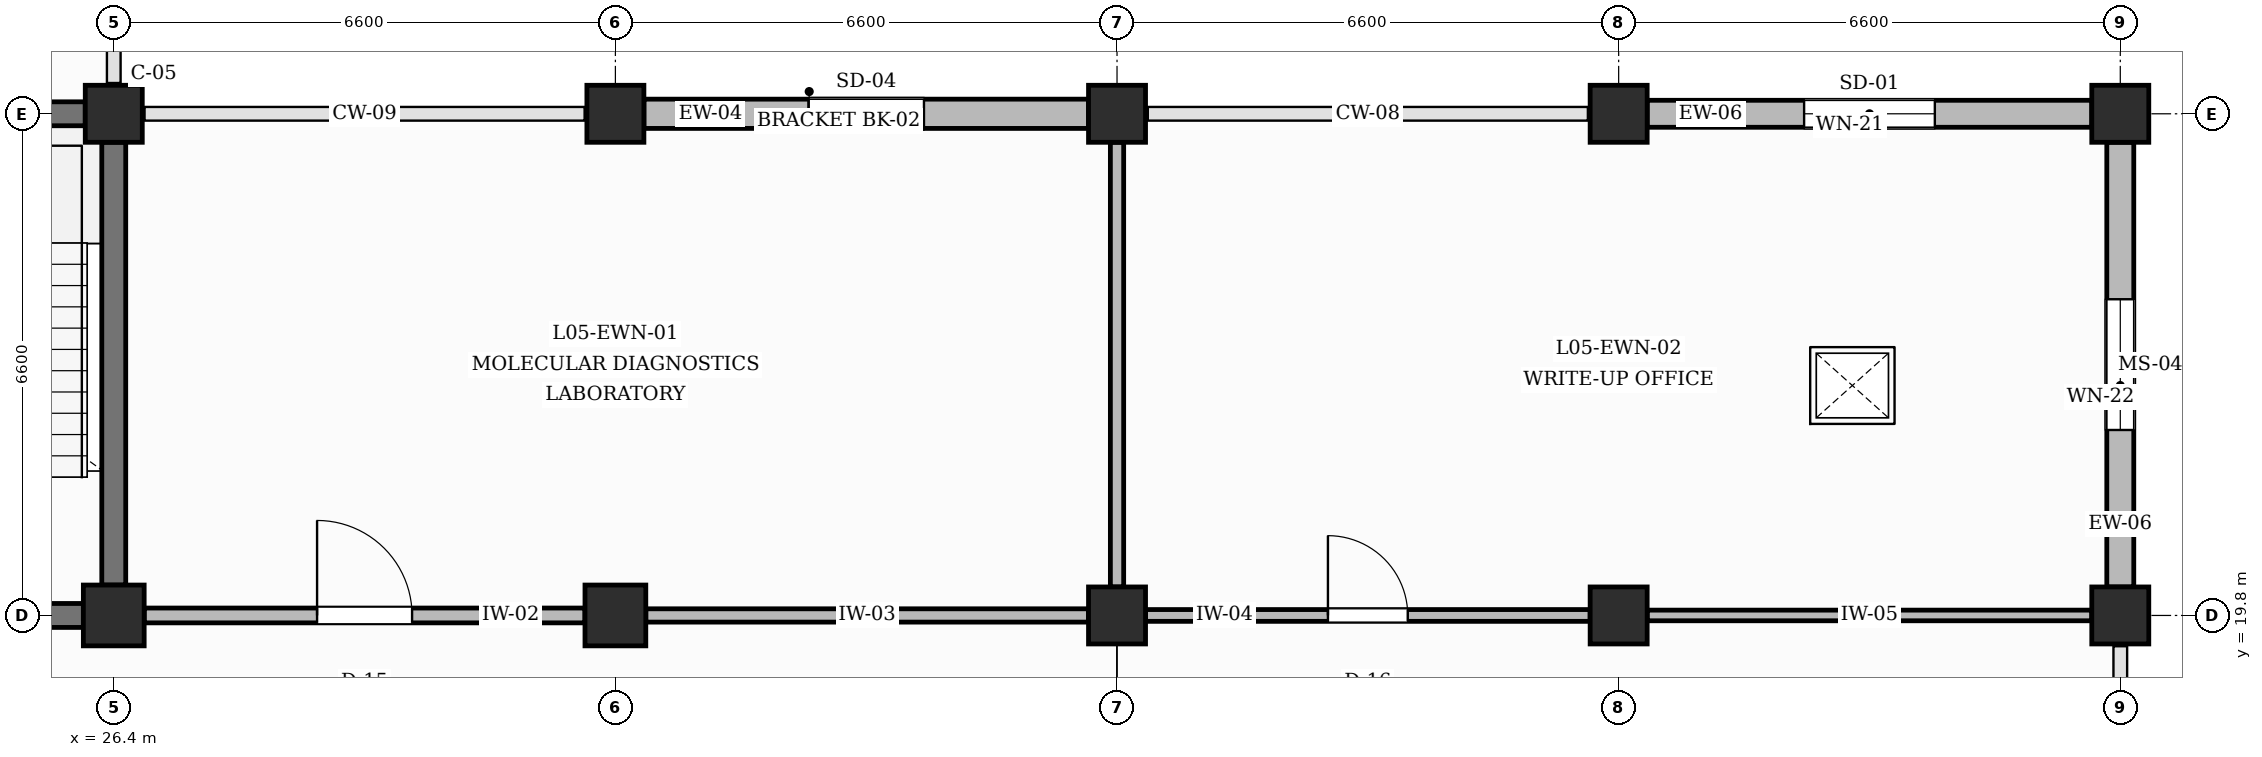
"""IFC4 building model, lengths in metres.
Left out: names, types, materials, properties, quantities, classifications, styles, units other than length and angle.
Written with IfcOpenShell. Run it as: python <this file> out.ifc"""

import sys

from ifc_helpers import new_model, si_unit, direction, frame, frame_2d, origin, origin_2d, place, context, subcontext, project, spatial, rectangle, extrude, element, fill, save


model = new_model("IFC4")
c1 = context("Model", 3, precision=1e-05, world=origin(), true_north=direction((0.0, 1.0)))
c2 = subcontext(c1, "Body", "Model", "MODEL_VIEW")
j1 = project(units=[si_unit("LENGTHUNIT", "METRE"), si_unit("PLANEANGLEUNIT", "RADIAN")], contexts=[c1])
p1 = place(None, origin())
s1 = spatial("IfcSite", under=j1, at=p1, CompositionType="ELEMENT")
p2 = place(p1, origin())
s2 = spatial("IfcBuilding", under=s1, at=p2, CompositionType="ELEMENT")
p3 = place(p2, frame((0.0, 0.0, 22.8)))
s3 = spatial("IfcBuildingStorey", under=s2, at=p3, CompositionType="ELEMENT", Elevation=22.8)
p4 = place(p3, frame((26.4, 19.8, 0.0), z_axis=(0.0, 0.0, 1.0), x_axis=(1.0, 0.0, 0.0)))
e1 = element("IfcColumn", 1, at=p4, inside=s3, PredefinedType="COLUMN", context=c2, shape_type="SweptSolid", body=[
    extrude(rectangle(XDim=0.8, YDim=0.8, at=origin_2d()), origin(), (0.0, 0.0, 1.0), 4.2),
])
p5 = place(p3, frame((26.4, 26.4, 0.0), z_axis=(0.0, 0.0, 1.0), x_axis=(1.0, 0.0, 0.0)))
e2 = element("IfcColumn", 2, at=p5, inside=s3, PredefinedType="COLUMN", context=c2, shape_type="SweptSolid", body=[
    extrude(rectangle(XDim=0.75, YDim=0.75, at=origin_2d()), origin(), (0.0, 0.0, 1.0), 4.2),
])
p6 = place(p3, frame((33.0, 19.8, 0.0), z_axis=(0.0, 0.0, 1.0), x_axis=(1.0, 0.0, 0.0)))
e3 = element("IfcColumn", 3, at=p6, inside=s3, PredefinedType="COLUMN", context=c2, shape_type="SweptSolid", body=[
    extrude(rectangle(XDim=0.8, YDim=0.8, at=origin_2d()), origin(), (0.0, 0.0, 1.0), 4.2),
])
for number, where, z_axis, x_axis in (
    (4, (33.0, 26.4, 0.0), (0.0, 0.0, 1.0), (1.0, 0.0, 0.0)),
    (5, (39.6, 19.8, 0.0), (0.0, 0.0, 1.0), (1.0, 0.0, 0.0)),
    (6, (39.6, 26.4, 0.0), (0.0, 0.0, 1.0), (1.0, 0.0, 0.0)),
    (7, (46.2, 19.8, 0.0), (0.0, 0.0, 1.0), (1.0, 0.0, 0.0)),
    (8, (46.2, 26.4, 0.0), (0.0, 0.0, 1.0), (1.0, 0.0, 0.0)),
    (9, (52.8, 19.8, 0.0), (0.0, 0.0, 1.0), (1.0, 0.0, 0.0)),
    (10, (52.8, 26.4, 0.0), (0.0, 0.0, 1.0), (1.0, 0.0, 0.0)),
):
    element("IfcColumn", number, at=place(p3, frame(where, z_axis=z_axis, x_axis=x_axis)), inside=s3, PredefinedType="COLUMN", context=c2, shape_type="SweptSolid", body=[
        extrude(rectangle(XDim=0.75, YDim=0.75, at=origin_2d()), origin(), (0.0, 0.0, 1.0), 4.2),
    ])
p7 = place(p3, frame((33.375, 26.4, 0.0), z_axis=(0.0, 0.0, 1.0), x_axis=(1.0, 0.0, 0.0)))
e11 = element("IfcWall", 11, at=p7, inside=s3, PredefinedType="SOLIDWALL", context=c2, shape_type="SweptSolid", body=[
    extrude(rectangle(XDim=5.85, YDim=0.385, at=frame_2d((2.925, 0.0))), origin(), (0.0, 0.0, 1.0), 3.27),
])
p8 = place(p7, frame((2.165, 0.0, 0.95)))
e12 = element("IfcOpeningElement", 12, at=p8, cuts=e11, PredefinedType="OPENING", context=c2, shape_type="SweptSolid", body=[
    extrude(rectangle(XDim=1.52, YDim=1.74, at=frame_2d((0.76, 0.87))), frame((0.0, 0.202, 0.0), z_axis=(0.0, -1.0, 0.0), x_axis=(1.0, 0.0, 0.0)), (0.0, 0.0, 1.0), 0.405),
])
p9 = place(p3, frame((46.575, 26.4, 0.0), z_axis=(0.0, 0.0, 1.0), x_axis=(1.0, 0.0, 0.0)))
e13 = element("IfcWall", 13, at=p9, inside=s3, PredefinedType="SOLIDWALL", context=c2, shape_type="SweptSolid", body=[
    extrude(rectangle(XDim=5.85, YDim=0.355, at=frame_2d((2.925, 0.0))), origin(), (0.0, 0.0, 1.0), 3.27),
])
p10 = place(p9, frame((2.065, 0.0, 0.95)))
e14 = element("IfcOpeningElement", 14, at=p10, cuts=e13, PredefinedType="OPENING", context=c2, shape_type="SweptSolid", body=[
    extrude(rectangle(XDim=1.72, YDim=1.3, at=frame_2d((0.86, 0.65))), frame((0.0, 0.188, 0.0), z_axis=(0.0, -1.0, 0.0), x_axis=(1.0, 0.0, 0.0)), (0.0, 0.0, 1.0), 0.375),
])
p11 = place(p3, frame((52.8, 20.175, 0.0), z_axis=(0.0, 0.0, 1.0), x_axis=(0.0, 1.0, 0.0)))
e15 = element("IfcWall", 15, at=p11, inside=s3, PredefinedType="SOLIDWALL", context=c2, shape_type="SweptSolid", body=[
    extrude(rectangle(XDim=5.85, YDim=0.355, at=frame_2d((2.925, 0.0))), origin(), (0.0, 0.0, 1.0), 3.27),
])
p12 = place(p11, frame((2.065, 0.0, 0.95)))
e16 = element("IfcOpeningElement", 16, at=p12, cuts=e15, PredefinedType="OPENING", context=c2, shape_type="SweptSolid", body=[
    extrude(rectangle(XDim=1.72, YDim=1.52, at=frame_2d((0.86, 0.76))), frame((0.0, 0.188, 0.0), z_axis=(0.0, -1.0, 0.0), x_axis=(1.0, 0.0, 0.0)), (0.0, 0.0, 1.0), 0.375),
])
p13 = place(p3, frame((20.2, 19.8, 0.0), z_axis=(0.0, 0.0, 1.0), x_axis=(1.0, 0.0, 0.0)))
e17 = element("IfcWall", 17, at=p13, inside=s3, PredefinedType="SHEAR", context=c2, shape_type="SweptSolid", body=[
    extrude(rectangle(XDim=5.8, YDim=0.315, at=frame_2d((2.9, 0.0))), origin(), (0.0, 0.0, 1.0), 3.17),
])
p14 = place(p13, frame((2.35, 0.0, 0.0)))
e18 = element("IfcOpeningElement", 18, at=p14, cuts=e17, PredefinedType="OPENING", context=c2, shape_type="SweptSolid", body=[
    extrude(rectangle(XDim=1.1, YDim=2.15, at=frame_2d((0.55, 1.075))), frame((0.0, 0.167, 0.0), z_axis=(0.0, -1.0, 0.0), x_axis=(1.0, 0.0, 0.0)), (0.0, 0.0, 1.0), 0.335),
])
for number, where, z_axis, x_axis in (
    (19, (20.2, 26.4, 0.0), (0.0, 0.0, 1.0), (1.0, 0.0, 0.0)),
    (20, (26.4, 20.2, 0.0), (0.0, 0.0, 1.0), (0.0, 1.0, 0.0)),
):
    element("IfcWall", number, at=place(p3, frame(where, z_axis=z_axis, x_axis=x_axis)), inside=s3, PredefinedType="SHEAR", context=c2, shape_type="SweptSolid", body=[
        extrude(rectangle(XDim=5.825, YDim=0.315, at=frame_2d((2.913, 0.0))), origin(), (0.0, 0.0, 1.0), 3.17),
    ])
p15 = place(p3, frame((26.8, 19.8, 0.0), z_axis=(0.0, 0.0, 1.0), x_axis=(1.0, 0.0, 0.0)))
e21 = element("IfcWall", 21, at=p15, inside=s3, PredefinedType="PARTITIONING", context=c2, shape_type="SweptSolid", body=[
    extrude(rectangle(XDim=5.8, YDim=0.195, at=frame_2d((2.9, 0.0))), origin(), (0.0, 0.0, 1.0), 3.17),
])
p16 = place(p15, frame((2.275, 0.0, 0.0)))
e22 = element("IfcOpeningElement", 22, at=p16, cuts=e21, PredefinedType="OPENING", context=c2, shape_type="SweptSolid", body=[
    extrude(rectangle(XDim=1.25, YDim=2.25, at=frame_2d((0.625, 1.125))), frame((0.0, 0.107, 0.0), z_axis=(0.0, -1.0, 0.0), x_axis=(1.0, 0.0, 0.0)), (0.0, 0.0, 1.0), 0.215),
])
p17 = place(p3, frame((33.4, 19.8, 0.0), z_axis=(0.0, 0.0, 1.0), x_axis=(1.0, 0.0, 0.0)))
e23 = element("IfcWall", 23, at=p17, inside=s3, PredefinedType="PARTITIONING", context=c2, shape_type="SweptSolid", body=[
    extrude(rectangle(XDim=5.825, YDim=0.175, at=frame_2d((2.913, 0.0))), origin(), (0.0, 0.0, 1.0), 3.17),
])
p18 = place(p3, frame((39.6, 20.175, 0.0), z_axis=(0.0, 0.0, 1.0), x_axis=(0.0, 1.0, 0.0)))
e24 = element("IfcWall", 24, at=p18, inside=s3, PredefinedType="PARTITIONING", context=c2, shape_type="SweptSolid", body=[
    extrude(rectangle(XDim=5.85, YDim=0.175, at=frame_2d((2.925, 0.0))), origin(), (0.0, 0.0, 1.0), 3.42),
])
p19 = place(p3, frame((39.975, 19.8, 0.0), z_axis=(0.0, 0.0, 1.0), x_axis=(1.0, 0.0, 0.0)))
e25 = element("IfcWall", 25, at=p19, inside=s3, PredefinedType="PARTITIONING", context=c2, shape_type="SweptSolid", body=[
    extrude(rectangle(XDim=5.85, YDim=0.155, at=frame_2d((2.925, 0.0))), origin(), (0.0, 0.0, 1.0), 3.17),
])
p20 = place(p19, frame((2.4, 0.0, 0.0)))
e26 = element("IfcOpeningElement", 26, at=p20, cuts=e25, PredefinedType="OPENING", context=c2, shape_type="SweptSolid", body=[
    extrude(rectangle(XDim=1.05, YDim=2.15, at=frame_2d((0.525, 1.075))), frame((0.0, 0.087, 0.0), z_axis=(0.0, -1.0, 0.0), x_axis=(1.0, 0.0, 0.0)), (0.0, 0.0, 1.0), 0.175),
])
p21 = place(p3, frame((46.575, 19.8, 0.0), z_axis=(0.0, 0.0, 1.0), x_axis=(1.0, 0.0, 0.0)))
e27 = element("IfcWall", 27, at=p21, inside=s3, PredefinedType="PARTITIONING", context=c2, shape_type="SweptSolid", body=[
    extrude(rectangle(XDim=5.85, YDim=0.14, at=frame_2d((2.925, 0.0))), origin(), (0.0, 0.0, 1.0), 3.17),
])
p22 = place(p8, origin())
e28 = element("IfcWindow", 28, at=p22, inside=s3, PartitioningType="DOUBLE_PANEL_VERTICAL", PredefinedType="WINDOW", context=c2, shape_type="SweptSolid", body=[
    extrude(rectangle(XDim=1.52, YDim=1.74, at=frame_2d((0.76, 0.87))), frame((0.0, 0.03, 0.0), z_axis=(0.0, -1.0, 0.0), x_axis=(1.0, 0.0, 0.0)), (0.0, 0.0, 1.0), 0.06),
])
fill(e12, e28)
p23 = place(p10, origin())
e29 = element("IfcWindow", 29, at=p23, inside=s3, PartitioningType="DOUBLE_PANEL_VERTICAL", PredefinedType="WINDOW", context=c2, shape_type="SweptSolid", body=[
    extrude(rectangle(XDim=1.72, YDim=1.3, at=frame_2d((0.86, 0.65))), frame((0.0, 0.03, 0.0), z_axis=(0.0, -1.0, 0.0), x_axis=(1.0, 0.0, 0.0)), (0.0, 0.0, 1.0), 0.06),
])
fill(e14, e29)
p24 = place(p12, origin())
e30 = element("IfcWindow", 30, at=p24, inside=s3, PartitioningType="DOUBLE_PANEL_VERTICAL", PredefinedType="WINDOW", context=c2, shape_type="SweptSolid", body=[
    extrude(rectangle(XDim=1.72, YDim=1.52, at=frame_2d((0.86, 0.76))), frame((0.0, 0.03, 0.0), z_axis=(0.0, -1.0, 0.0), x_axis=(1.0, 0.0, 0.0)), (0.0, 0.0, 1.0), 0.06),
])
fill(e16, e30)
p25 = place(p16, origin())
e31 = element("IfcDoor", 31, at=p25, inside=s3, OperationType="SINGLE_SWING_LEFT", PredefinedType="DOOR", context=c2, shape_type="SweptSolid", body=[
    extrude(rectangle(XDim=1.25, YDim=2.25, at=frame_2d((0.625, 1.125))), frame((0.0, 0.025, 0.0), z_axis=(0.0, -1.0, 0.0), x_axis=(1.0, 0.0, 0.0)), (0.0, 0.0, 1.0), 0.05),
])
fill(e22, e31)
p26 = place(p20, origin())
e32 = element("IfcDoor", 32, at=p26, inside=s3, OperationType="SINGLE_SWING_LEFT", PredefinedType="DOOR", context=c2, shape_type="SweptSolid", body=[
    extrude(rectangle(XDim=1.05, YDim=2.15, at=frame_2d((0.525, 1.075))), frame((0.0, 0.025, 0.0), z_axis=(0.0, -1.0, 0.0), x_axis=(1.0, 0.0, 0.0)), (0.0, 0.0, 1.0), 0.05),
])
fill(e26, e32)
save(model, sys.argv[1])
